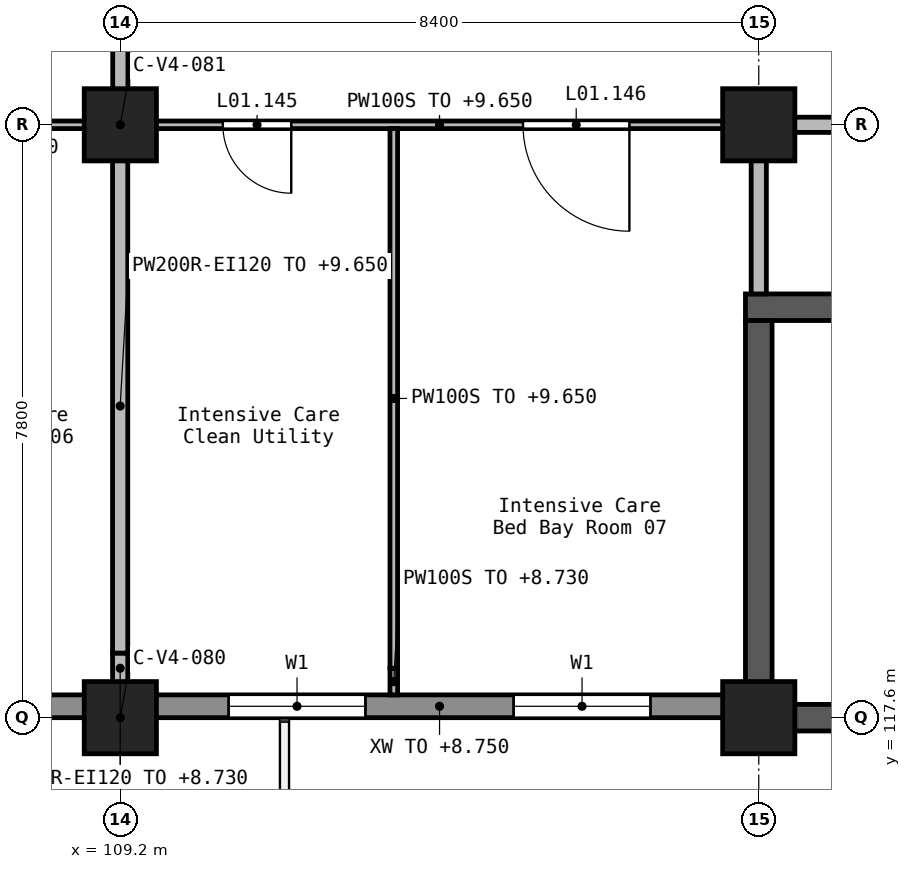
"""IFC4 building model, lengths in metres.
Left out: names, types, materials, properties, quantities, classifications, styles, units other than length and angle.
Written with IfcOpenShell. Run it as: python <this file> out.ifc"""

import sys

from ifc_helpers import new_model, si_unit, direction, frame, frame_2d, origin, origin_2d, place, context, subcontext, project, spatial, rectangle, extrude, element, fill, save


model = new_model("IFC4")
c1 = context("Model", 3, precision=1e-05, world=origin(), true_north=direction((0.0, 1.0)))
c2 = subcontext(c1, "Body", "Model", "MODEL_VIEW")
j1 = project(units=[si_unit("LENGTHUNIT", "METRE"), si_unit("PLANEANGLEUNIT", "RADIAN")], contexts=[c1])
p1 = place(None, origin())
s1 = spatial("IfcSite", under=j1, at=p1, CompositionType="ELEMENT")
p2 = place(p1, origin())
s2 = spatial("IfcBuilding", under=s1, at=p2, CompositionType="ELEMENT")
p3 = place(p2, frame((0.0, 0.0, 5.4)))
s3 = spatial("IfcBuildingStorey", under=s2, at=p3, CompositionType="ELEMENT", Elevation=5.4)
for number, where, z_axis, x_axis in (
    (1, (109.2, 117.6, 0.0), (0.0, 0.0, 1.0), (1.0, 0.0, 0.0)),
    (2, (109.2, 125.4, 0.0), (0.0, 0.0, 1.0), (1.0, 0.0, 0.0)),
    (3, (117.6, 117.6, 0.0), (0.0, 0.0, 1.0), (1.0, 0.0, 0.0)),
    (4, (117.6, 125.4, 0.0), (0.0, 0.0, 1.0), (1.0, 0.0, 0.0)),
):
    element("IfcColumn", number, at=place(p3, frame(where, z_axis=z_axis, x_axis=x_axis)), inside=s3, PredefinedType="COLUMN", context=c2, shape_type="SweptSolid", body=[
        extrude(rectangle(XDim=0.95, YDim=0.95, at=origin_2d()), origin(), (0.0, 0.0, 1.0), 4.5),
    ])
p4 = place(p3, frame((117.425, 123.0, 0.0), z_axis=(0.0, 0.0, 1.0), x_axis=(1.0, 0.0, 0.0)))
e5 = element("IfcWall", 5, at=p4, inside=s3, PredefinedType="SHEAR", context=c2, shape_type="SweptSolid", body=[
    extrude(rectangle(XDim=8.4, YDim=0.35, at=frame_2d((4.2, 0.0))), origin(), (0.0, 0.0, 1.0), 4.5),
])
p5 = place(p4, frame((6.875, 0.0, 0.0)))
e6 = element("IfcOpeningElement", 6, at=p5, cuts=e5, PredefinedType="OPENING", context=c2, shape_type="SweptSolid", body=[
    extrude(rectangle(XDim=1.1, YDim=2.1, at=frame_2d((0.55, 1.05))), frame((0.0, 0.185, 0.0), z_axis=(0.0, -1.0, 0.0), x_axis=(1.0, 0.0, 0.0)), (0.0, 0.0, 1.0), 0.37),
])
p6 = place(p3, frame((117.6, 117.425, 0.0), z_axis=(0.0, 0.0, 1.0), x_axis=(0.0, 1.0, 0.0)))
e7 = element("IfcWall", 7, at=p6, inside=s3, PredefinedType="SHEAR", context=c2, shape_type="SweptSolid", body=[
    extrude(rectangle(XDim=5.4, YDim=0.35, at=frame_2d((2.7, 0.0))), origin(), (0.0, 0.0, 1.0), 4.5),
])
p7 = place(p3, frame((117.775, 117.6, 0.0), z_axis=(0.0, 0.0, 1.0), x_axis=(1.0, 0.0, 0.0)))
e8 = element("IfcWall", 8, at=p7, inside=s3, PredefinedType="SHEAR", context=c2, shape_type="SweptSolid", body=[
    extrude(rectangle(XDim=8.05, YDim=0.35, at=frame_2d((4.025, 0.0))), origin(), (0.0, 0.0, 1.0), 4.5),
])
p8 = place(p3, frame((101.25, 117.75, 0.0), z_axis=(0.0, 0.0, 1.0), x_axis=(1.0, 0.0, 0.0)))
e9 = element("IfcWall", 9, at=p8, inside=s3, PredefinedType="STANDARD", context=c2, shape_type="SweptSolid", body=[
    extrude(rectangle(XDim=7.5, YDim=0.3, at=frame_2d((3.75, 0.0))), origin(), (0.0, 0.0, 1.0), 3.35),
])
p9 = place(p8, frame((0.975, 0.0, 0.9)))
e10 = element("IfcOpeningElement", 10, at=p9, cuts=e9, PredefinedType="OPENING", context=c2, shape_type="SweptSolid", body=[
    extrude(rectangle(XDim=1.8, YDim=1.5, at=frame_2d((0.9, 0.75))), frame((0.0, 0.16, 0.0), z_axis=(0.0, -1.0, 0.0), x_axis=(1.0, 0.0, 0.0)), (0.0, 0.0, 1.0), 0.32),
])
p10 = place(p8, frame((4.725, 0.0, 0.9)))
e11 = element("IfcOpeningElement", 11, at=p10, cuts=e9, PredefinedType="OPENING", context=c2, shape_type="SweptSolid", body=[
    extrude(rectangle(XDim=1.8, YDim=1.5, at=frame_2d((0.9, 0.75))), frame((0.0, 0.16, 0.0), z_axis=(0.0, -1.0, 0.0), x_axis=(1.0, 0.0, 0.0)), (0.0, 0.0, 1.0), 0.32),
])
p11 = place(p3, frame((109.65, 117.75, 0.0), z_axis=(0.0, 0.0, 1.0), x_axis=(1.0, 0.0, 0.0)))
e12 = element("IfcWall", 12, at=p11, inside=s3, PredefinedType="STANDARD", context=c2, shape_type="SweptSolid", body=[
    extrude(rectangle(XDim=7.5, YDim=0.3, at=frame_2d((3.75, 0.0))), origin(), (0.0, 0.0, 1.0), 3.35),
])
p12 = place(p11, frame((0.975, 0.0, 0.9)))
e13 = element("IfcOpeningElement", 13, at=p12, cuts=e12, PredefinedType="OPENING", context=c2, shape_type="SweptSolid", body=[
    extrude(rectangle(XDim=1.8, YDim=1.5, at=frame_2d((0.9, 0.75))), frame((0.0, 0.16, 0.0), z_axis=(0.0, -1.0, 0.0), x_axis=(1.0, 0.0, 0.0)), (0.0, 0.0, 1.0), 0.32),
])
p13 = place(p11, frame((4.725, 0.0, 0.9)))
e14 = element("IfcOpeningElement", 14, at=p13, cuts=e12, PredefinedType="OPENING", context=c2, shape_type="SweptSolid", body=[
    extrude(rectangle(XDim=1.8, YDim=1.5, at=frame_2d((0.9, 0.75))), frame((0.0, 0.16, 0.0), z_axis=(0.0, -1.0, 0.0), x_axis=(1.0, 0.0, 0.0)), (0.0, 0.0, 1.0), 0.32),
])
p14 = place(p3, frame((109.2, 128.55, 0.0), z_axis=(0.0, 0.0, 1.0), x_axis=(0.0, -1.0, 0.0)))
e15 = element("IfcWall", 15, at=p14, inside=s3, PredefinedType="SOLIDWALL", context=c2, shape_type="SweptSolid", body=[
    extrude(rectangle(XDim=2.7, YDim=0.2, at=frame_2d((1.35, 0.0))), origin(), (0.0, 0.0, 1.0), 4.25),
])
p15 = place(p3, frame((118.05, 125.4, 0.0), z_axis=(0.0, 0.0, 1.0), x_axis=(1.0, 0.0, 0.0)))
e16 = element("IfcWall", 16, at=p15, inside=s3, PredefinedType="SOLIDWALL", context=c2, shape_type="SweptSolid", body=[
    extrude(rectangle(XDim=7.5, YDim=0.2, at=frame_2d((3.75, 0.0))), origin(), (0.0, 0.0, 1.0), 4.25),
])
p16 = place(p15, frame((3.2, 0.0, 0.0)))
e17 = element("IfcOpeningElement", 17, at=p16, cuts=e16, PredefinedType="OPENING", context=c2, shape_type="SweptSolid", body=[
    extrude(rectangle(XDim=1.1, YDim=2.1, at=frame_2d((0.55, 1.05))), frame((0.0, 0.11, 0.0), z_axis=(0.0, -1.0, 0.0), x_axis=(1.0, 0.0, 0.0)), (0.0, 0.0, 1.0), 0.22),
])
p17 = place(p3, frame((109.198, 118.05, 0.0), z_axis=(0.0, 0.0, 1.0), x_axis=(0.0, 1.0, 0.0)))
e18 = element("IfcWall", 18, at=p17, inside=s3, PredefinedType="SOLIDWALL", context=c2, shape_type="SweptSolid", body=[
    extrude(rectangle(XDim=0.4, YDim=0.2, at=frame_2d((0.2, 0.0))), origin(), (0.0, 0.0, 1.0), 3.33),
])
p18 = place(p3, frame((109.198, 118.45, 0.0), z_axis=(0.0, 0.0, 1.0), x_axis=(0.0, 1.0, 0.0)))
e19 = element("IfcWall", 19, at=p18, inside=s3, PredefinedType="SOLIDWALL", context=c2, shape_type="SweptSolid", body=[
    extrude(rectangle(XDim=6.5, YDim=0.2, at=frame_2d((3.25, 0.0))), origin(), (0.0, 0.0, 1.0), 4.25),
])
p19 = place(p3, frame((117.6, 123.175, 0.0), z_axis=(0.0, 0.0, 1.0), x_axis=(0.0, 1.0, 0.0)))
e20 = element("IfcWall", 20, at=p19, inside=s3, PredefinedType="SOLIDWALL", context=c2, shape_type="SweptSolid", body=[
    extrude(rectangle(XDim=1.775, YDim=0.2, at=frame_2d((0.887, 0.0))), origin(), (0.0, 0.0, 1.0), 4.25),
])
p20 = place(p3, frame((117.15, 125.4, 0.0), z_axis=(0.0, 0.0, 1.0), x_axis=(-1.0, 0.0, 0.0)))
e21 = element("IfcWall", 21, at=p20, inside=s3, PredefinedType="PARTITIONING", context=c2, shape_type="SweptSolid", body=[
    extrude(rectangle(XDim=7.5, YDim=0.1, at=frame_2d((3.75, 0.0))), origin(), (0.0, 0.0, 1.0), 4.25),
])
p21 = place(p20, frame((5.701, 0.0, 0.0)))
e22 = element("IfcOpeningElement", 22, at=p21, cuts=e21, PredefinedType="OPENING", context=c2, shape_type="SweptSolid", body=[
    extrude(rectangle(XDim=0.9, YDim=2.1, at=frame_2d((0.45, 1.05))), frame((0.0, 0.06, 0.0), z_axis=(0.0, -1.0, 0.0), x_axis=(1.0, 0.0, 0.0)), (0.0, 0.0, 1.0), 0.12),
])
p22 = place(p20, frame((1.252, 0.0, 0.0)))
e23 = element("IfcOpeningElement", 23, at=p22, cuts=e21, PredefinedType="OPENING", context=c2, shape_type="SweptSolid", body=[
    extrude(rectangle(XDim=1.4, YDim=2.1, at=frame_2d((0.7, 1.05))), frame((0.0, 0.06, 0.0), z_axis=(0.0, -1.0, 0.0), x_axis=(1.0, 0.0, 0.0)), (0.0, 0.0, 1.0), 0.12),
])
p23 = place(p3, frame((101.25, 125.4, 0.0), z_axis=(0.0, 0.0, 1.0), x_axis=(1.0, 0.0, 0.0)))
e24 = element("IfcWall", 24, at=p23, inside=s3, PredefinedType="PARTITIONING", context=c2, shape_type="SweptSolid", body=[
    extrude(rectangle(XDim=7.5, YDim=0.1, at=frame_2d((3.75, 0.0))), origin(), (0.0, 0.0, 1.0), 4.25),
])
p24 = place(p23, frame((1.249, 0.0, 0.0)))
e25 = element("IfcOpeningElement", 25, at=p24, cuts=e24, PredefinedType="OPENING", context=c2, shape_type="SweptSolid", body=[
    extrude(rectangle(XDim=1.4, YDim=2.1, at=frame_2d((0.7, 1.05))), frame((0.0, 0.06, 0.0), z_axis=(0.0, -1.0, 0.0), x_axis=(1.0, 0.0, 0.0)), (0.0, 0.0, 1.0), 0.12),
])
p25 = place(p23, frame((5.448, 0.0, 0.0)))
e26 = element("IfcOpeningElement", 26, at=p25, cuts=e24, PredefinedType="OPENING", context=c2, shape_type="SweptSolid", body=[
    extrude(rectangle(XDim=1.4, YDim=2.1, at=frame_2d((0.7, 1.05))), frame((0.0, 0.06, 0.0), z_axis=(0.0, -1.0, 0.0), x_axis=(1.0, 0.0, 0.0)), (0.0, 0.0, 1.0), 0.12),
])
p26 = place(p3, frame((112.798, 117.9, 0.0), z_axis=(0.0, 0.0, 1.0), x_axis=(0.0, 1.0, 0.0)))
e27 = element("IfcWall", 27, at=p26, inside=s3, PredefinedType="PARTITIONING", context=c2, shape_type="SweptSolid", body=[
    extrude(rectangle(XDim=0.35, YDim=0.1, at=frame_2d((0.175, 0.0))), origin(), (0.0, 0.0, 1.0), 3.33),
])
p27 = place(p3, frame((112.798, 118.25, 0.0), z_axis=(0.0, 0.0, 1.0), x_axis=(0.0, 1.0, 0.0)))
e28 = element("IfcWall", 28, at=p27, inside=s3, PredefinedType="PARTITIONING", context=c2, shape_type="SweptSolid", body=[
    extrude(rectangle(XDim=7.1, YDim=0.1, at=frame_2d((3.55, 0.0))), origin(), (0.0, 0.0, 1.0), 4.25),
])
p28 = place(p12, origin())
e29 = element("IfcWindow", 29, at=p28, inside=s3, PartitioningType="SINGLE_PANEL", PredefinedType="WINDOW", context=c2, shape_type="SweptSolid", body=[
    extrude(rectangle(XDim=1.8, YDim=1.5, at=frame_2d((0.9, 0.75))), frame((0.0, 0.03, 0.0), z_axis=(0.0, -1.0, 0.0), x_axis=(1.0, 0.0, 0.0)), (0.0, 0.0, 1.0), 0.06),
])
fill(e13, e29)
p29 = place(p13, origin())
e30 = element("IfcWindow", 30, at=p29, inside=s3, PartitioningType="SINGLE_PANEL", PredefinedType="WINDOW", context=c2, shape_type="SweptSolid", body=[
    extrude(rectangle(XDim=1.8, YDim=1.5, at=frame_2d((0.9, 0.75))), frame((0.0, 0.03, 0.0), z_axis=(0.0, -1.0, 0.0), x_axis=(1.0, 0.0, 0.0)), (0.0, 0.0, 1.0), 0.06),
])
fill(e14, e30)
p30 = place(p21, origin())
e31 = element("IfcDoor", 31, at=p30, inside=s3, OperationType="SINGLE_SWING_RIGHT", PredefinedType="DOOR", context=c2, shape_type="SweptSolid", body=[
    extrude(rectangle(XDim=0.9, YDim=2.1, at=frame_2d((0.45, 1.05))), frame((0.0, 0.025, 0.0), z_axis=(0.0, -1.0, 0.0), x_axis=(1.0, 0.0, 0.0)), (0.0, 0.0, 1.0), 0.05),
])
fill(e22, e31)
p31 = place(p22, origin())
e32 = element("IfcDoor", 32, at=p31, inside=s3, OperationType="DOUBLE_DOOR_SINGLE_SWING", PredefinedType="DOOR", context=c2, shape_type="SweptSolid", body=[
    extrude(rectangle(XDim=1.4, YDim=2.1, at=frame_2d((0.7, 1.05))), frame((0.0, 0.025, 0.0), z_axis=(0.0, -1.0, 0.0), x_axis=(1.0, 0.0, 0.0)), (0.0, 0.0, 1.0), 0.05),
])
fill(e23, e32)
save(model, sys.argv[1])
